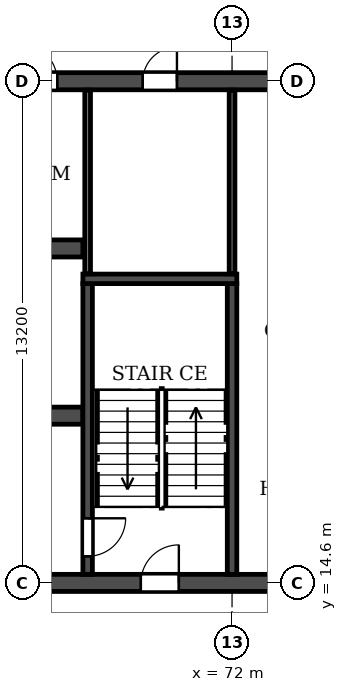
"""IFC4 building model, lengths in metres.
Left out: names, types, materials, properties, quantities, classifications, styles, units other than length and angle.
Written with IfcOpenShell. Run it as: python <this file> out.ifc"""

import sys

from ifc_helpers import new_model, si_unit, direction, frame, frame_2d, origin, place, context, subcontext, project, spatial, rectangle, extrude, element, fill, save


model = new_model("IFC4")
c1 = context("Model", 3, precision=1e-05, world=origin(), true_north=direction((0.0, 1.0)))
c2 = subcontext(c1, "Body", "Model", "MODEL_VIEW")
j1 = project(units=[si_unit("LENGTHUNIT", "METRE"), si_unit("PLANEANGLEUNIT", "RADIAN")], contexts=[c1])
p1 = place(None, origin())
s1 = spatial("IfcSite", under=j1, at=p1, CompositionType="ELEMENT")
p2 = place(p1, origin())
s2 = spatial("IfcBuilding", under=s1, at=p2, CompositionType="ELEMENT")
p3 = place(p2, frame((0.0, 0.0, 122.4)))
s3 = spatial("IfcBuildingStorey", under=s2, at=p3, CompositionType="ELEMENT", Elevation=122.4)
p4 = place(p3, frame((12.2, 14.6, 0.0), z_axis=(0.0, 0.0, 1.0), x_axis=(1.0, 0.0, 0.0)))
e1 = element("IfcWall", 1, at=p4, inside=s3, PredefinedType="SOLIDWALL", context=c2, shape_type="SweptSolid", body=[
    extrude(rectangle(XDim=77.6, YDim=0.45, at=frame_2d((38.8, 0.0))), origin(), (0.0, 0.0, 1.0), 3.07),
])
p5 = place(p4, frame((0.8, 0.0, 0.0)))
e2 = element("IfcOpeningElement", 2, at=p5, cuts=e1, PredefinedType="OPENING", context=c2, shape_type="SweptSolid", body=[
    extrude(rectangle(XDim=1.0, YDim=2.1, at=frame_2d((0.5, 1.05))), frame((0.0, 0.235, 0.0), z_axis=(0.0, -1.0, 0.0), x_axis=(1.0, 0.0, 0.0)), (0.0, 0.0, 1.0), 0.47),
])
p6 = place(p4, frame((3.8, 0.0, 0.0)))
e3 = element("IfcOpeningElement", 3, at=p6, cuts=e1, PredefinedType="OPENING", context=c2, shape_type="SweptSolid", body=[
    extrude(rectangle(XDim=1.0, YDim=2.1, at=frame_2d((0.5, 1.05))), frame((0.0, 0.235, 0.0), z_axis=(0.0, -1.0, 0.0), x_axis=(1.0, 0.0, 0.0)), (0.0, 0.0, 1.0), 0.47),
])
p7 = place(p4, frame((6.7, 0.0, 0.0)))
e4 = element("IfcOpeningElement", 4, at=p7, cuts=e1, PredefinedType="OPENING", context=c2, shape_type="SweptSolid", body=[
    extrude(rectangle(XDim=1.0, YDim=2.1, at=frame_2d((0.5, 1.05))), frame((0.0, 0.235, 0.0), z_axis=(0.0, -1.0, 0.0), x_axis=(1.0, 0.0, 0.0)), (0.0, 0.0, 1.0), 0.47),
])
p8 = place(p4, frame((14.6, 0.0, 0.0)))
e5 = element("IfcOpeningElement", 5, at=p8, cuts=e1, PredefinedType="OPENING", context=c2, shape_type="SweptSolid", body=[
    extrude(rectangle(XDim=1.0, YDim=2.1, at=frame_2d((0.5, 1.05))), frame((0.0, 0.235, 0.0), z_axis=(0.0, -1.0, 0.0), x_axis=(1.0, 0.0, 0.0)), (0.0, 0.0, 1.0), 0.47),
])
p9 = place(p4, frame((19.2, 0.0, 0.0)))
e6 = element("IfcOpeningElement", 6, at=p9, cuts=e1, PredefinedType="OPENING", context=c2, shape_type="SweptSolid", body=[
    extrude(rectangle(XDim=1.0, YDim=2.1, at=frame_2d((0.5, 1.05))), frame((0.0, 0.235, 0.0), z_axis=(0.0, -1.0, 0.0), x_axis=(1.0, 0.0, 0.0)), (0.0, 0.0, 1.0), 0.47),
])
p10 = place(p4, frame((30.5, 0.0, 0.0)))
e7 = element("IfcOpeningElement", 7, at=p10, cuts=e1, PredefinedType="OPENING", context=c2, shape_type="SweptSolid", body=[
    extrude(rectangle(XDim=1.0, YDim=2.1, at=frame_2d((0.5, 1.05))), frame((0.0, 0.235, 0.0), z_axis=(0.0, -1.0, 0.0), x_axis=(1.0, 0.0, 0.0)), (0.0, 0.0, 1.0), 0.47),
])
p11 = place(p4, frame((34.4, 0.0, 0.0)))
e8 = element("IfcOpeningElement", 8, at=p11, cuts=e1, PredefinedType="OPENING", context=c2, shape_type="SweptSolid", body=[
    extrude(rectangle(XDim=1.0, YDim=2.1, at=frame_2d((0.5, 1.05))), frame((0.0, 0.235, 0.0), z_axis=(0.0, -1.0, 0.0), x_axis=(1.0, 0.0, 0.0)), (0.0, 0.0, 1.0), 0.47),
])
p12 = place(p4, frame((38.3, 0.0, 0.0)))
e9 = element("IfcOpeningElement", 9, at=p12, cuts=e1, PredefinedType="OPENING", context=c2, shape_type="SweptSolid", body=[
    extrude(rectangle(XDim=1.0, YDim=2.1, at=frame_2d((0.5, 1.05))), frame((0.0, 0.235, 0.0), z_axis=(0.0, -1.0, 0.0), x_axis=(1.0, 0.0, 0.0)), (0.0, 0.0, 1.0), 0.47),
])
p13 = place(p4, frame((40.9, 0.0, 0.0)))
e10 = element("IfcOpeningElement", 10, at=p13, cuts=e1, PredefinedType="OPENING", context=c2, shape_type="SweptSolid", body=[
    extrude(rectangle(XDim=1.0, YDim=2.1, at=frame_2d((0.5, 1.05))), frame((0.0, 0.235, 0.0), z_axis=(0.0, -1.0, 0.0), x_axis=(1.0, 0.0, 0.0)), (0.0, 0.0, 1.0), 0.47),
])
p14 = place(p4, frame((44.8, 0.0, 0.0)))
e11 = element("IfcOpeningElement", 11, at=p14, cuts=e1, PredefinedType="OPENING", context=c2, shape_type="SweptSolid", body=[
    extrude(rectangle(XDim=1.0, YDim=2.1, at=frame_2d((0.5, 1.05))), frame((0.0, 0.235, 0.0), z_axis=(0.0, -1.0, 0.0), x_axis=(1.0, 0.0, 0.0)), (0.0, 0.0, 1.0), 0.47),
])
p15 = place(p4, frame((57.4, 0.0, 0.0)))
e12 = element("IfcOpeningElement", 12, at=p15, cuts=e1, PredefinedType="OPENING", context=c2, shape_type="SweptSolid", body=[
    extrude(rectangle(XDim=1.0, YDim=2.1, at=frame_2d((0.5, 1.05))), frame((0.0, 0.235, 0.0), z_axis=(0.0, -1.0, 0.0), x_axis=(1.0, 0.0, 0.0)), (0.0, 0.0, 1.0), 0.47),
])
p16 = place(p4, frame((62.0, 0.0, 0.0)))
e13 = element("IfcOpeningElement", 13, at=p16, cuts=e1, PredefinedType="OPENING", context=c2, shape_type="SweptSolid", body=[
    extrude(rectangle(XDim=1.0, YDim=2.1, at=frame_2d((0.5, 1.05))), frame((0.0, 0.235, 0.0), z_axis=(0.0, -1.0, 0.0), x_axis=(1.0, 0.0, 0.0)), (0.0, 0.0, 1.0), 0.47),
])
p17 = place(p4, frame((69.9, 0.0, 0.0)))
e14 = element("IfcOpeningElement", 14, at=p17, cuts=e1, PredefinedType="OPENING", context=c2, shape_type="SweptSolid", body=[
    extrude(rectangle(XDim=1.0, YDim=2.1, at=frame_2d((0.5, 1.05))), frame((0.0, 0.235, 0.0), z_axis=(0.0, -1.0, 0.0), x_axis=(1.0, 0.0, 0.0)), (0.0, 0.0, 1.0), 0.47),
])
p18 = place(p4, frame((72.8, 0.0, 0.0)))
e15 = element("IfcOpeningElement", 15, at=p18, cuts=e1, PredefinedType="OPENING", context=c2, shape_type="SweptSolid", body=[
    extrude(rectangle(XDim=1.0, YDim=2.1, at=frame_2d((0.5, 1.05))), frame((0.0, 0.235, 0.0), z_axis=(0.0, -1.0, 0.0), x_axis=(1.0, 0.0, 0.0)), (0.0, 0.0, 1.0), 0.47),
])
p19 = place(p4, frame((75.8, 0.0, 0.0)))
e16 = element("IfcOpeningElement", 16, at=p19, cuts=e1, PredefinedType="OPENING", context=c2, shape_type="SweptSolid", body=[
    extrude(rectangle(XDim=1.0, YDim=2.1, at=frame_2d((0.5, 1.05))), frame((0.0, 0.235, 0.0), z_axis=(0.0, -1.0, 0.0), x_axis=(1.0, 0.0, 0.0)), (0.0, 0.0, 1.0), 0.47),
])
p20 = place(p3, frame((12.2, 27.8, 0.0), z_axis=(0.0, 0.0, 1.0), x_axis=(1.0, 0.0, 0.0)))
e17 = element("IfcWall", 17, at=p20, inside=s3, PredefinedType="SOLIDWALL", context=c2, shape_type="SweptSolid", body=[
    extrude(rectangle(XDim=77.6, YDim=0.45, at=frame_2d((38.8, 0.0))), origin(), (0.0, 0.0, 1.0), 3.07),
])
p21 = place(p20, frame((0.8, 0.0, 0.0)))
e18 = element("IfcOpeningElement", 18, at=p21, cuts=e17, PredefinedType="OPENING", context=c2, shape_type="SweptSolid", body=[
    extrude(rectangle(XDim=1.0, YDim=2.1, at=frame_2d((0.5, 1.05))), frame((0.0, 0.235, 0.0), z_axis=(0.0, -1.0, 0.0), x_axis=(1.0, 0.0, 0.0)), (0.0, 0.0, 1.0), 0.47),
])
p22 = place(p20, frame((3.8, 0.0, 0.0)))
e19 = element("IfcOpeningElement", 19, at=p22, cuts=e17, PredefinedType="OPENING", context=c2, shape_type="SweptSolid", body=[
    extrude(rectangle(XDim=1.0, YDim=2.1, at=frame_2d((0.5, 1.05))), frame((0.0, 0.235, 0.0), z_axis=(0.0, -1.0, 0.0), x_axis=(1.0, 0.0, 0.0)), (0.0, 0.0, 1.0), 0.47),
])
p23 = place(p20, frame((6.7, 0.0, 0.0)))
e20 = element("IfcOpeningElement", 20, at=p23, cuts=e17, PredefinedType="OPENING", context=c2, shape_type="SweptSolid", body=[
    extrude(rectangle(XDim=1.0, YDim=2.1, at=frame_2d((0.5, 1.05))), frame((0.0, 0.235, 0.0), z_axis=(0.0, -1.0, 0.0), x_axis=(1.0, 0.0, 0.0)), (0.0, 0.0, 1.0), 0.47),
])
p24 = place(p20, frame((10.05, 0.0, 0.0)))
e21 = element("IfcOpeningElement", 21, at=p24, cuts=e17, PredefinedType="OPENING", context=c2, shape_type="SweptSolid", body=[
    extrude(rectangle(XDim=0.9, YDim=2.1, at=frame_2d((0.45, 1.05))), frame((0.0, 0.235, 0.0), z_axis=(0.0, -1.0, 0.0), x_axis=(1.0, 0.0, 0.0)), (0.0, 0.0, 1.0), 0.47),
])
p25 = place(p20, frame((19.25, 0.0, 0.0)))
e22 = element("IfcOpeningElement", 22, at=p25, cuts=e17, PredefinedType="OPENING", context=c2, shape_type="SweptSolid", body=[
    extrude(rectangle(XDim=0.9, YDim=2.1, at=frame_2d((0.45, 1.05))), frame((0.0, 0.235, 0.0), z_axis=(0.0, -1.0, 0.0), x_axis=(1.0, 0.0, 0.0)), (0.0, 0.0, 1.0), 0.47),
])
p26 = place(p20, frame((25.0, 0.0, 0.0)))
e23 = element("IfcOpeningElement", 23, at=p26, cuts=e17, PredefinedType="OPENING", context=c2, shape_type="SweptSolid", body=[
    extrude(rectangle(XDim=1.0, YDim=2.1, at=frame_2d((0.5, 1.05))), frame((0.0, 0.235, 0.0), z_axis=(0.0, -1.0, 0.0), x_axis=(1.0, 0.0, 0.0)), (0.0, 0.0, 1.0), 0.47),
])
p27 = place(p20, frame((30.2, 0.0, 0.0)))
e24 = element("IfcOpeningElement", 24, at=p27, cuts=e17, PredefinedType="OPENING", context=c2, shape_type="SweptSolid", body=[
    extrude(rectangle(XDim=1.0, YDim=2.1, at=frame_2d((0.5, 1.05))), frame((0.0, 0.235, 0.0), z_axis=(0.0, -1.0, 0.0), x_axis=(1.0, 0.0, 0.0)), (0.0, 0.0, 1.0), 0.47),
])
p28 = place(p20, frame((35.4, 0.0, 0.0)))
e25 = element("IfcOpeningElement", 25, at=p28, cuts=e17, PredefinedType="OPENING", context=c2, shape_type="SweptSolid", body=[
    extrude(rectangle(XDim=1.0, YDim=2.1, at=frame_2d((0.5, 1.05))), frame((0.0, 0.235, 0.0), z_axis=(0.0, -1.0, 0.0), x_axis=(1.0, 0.0, 0.0)), (0.0, 0.0, 1.0), 0.47),
])
p29 = place(p20, frame((38.3, 0.0, 0.0)))
e26 = element("IfcOpeningElement", 26, at=p29, cuts=e17, PredefinedType="OPENING", context=c2, shape_type="SweptSolid", body=[
    extrude(rectangle(XDim=1.0, YDim=2.1, at=frame_2d((0.5, 1.05))), frame((0.0, 0.235, 0.0), z_axis=(0.0, -1.0, 0.0), x_axis=(1.0, 0.0, 0.0)), (0.0, 0.0, 1.0), 0.47),
])
p30 = place(p20, frame((41.2, 0.0, 0.0)))
e27 = element("IfcOpeningElement", 27, at=p30, cuts=e17, PredefinedType="OPENING", context=c2, shape_type="SweptSolid", body=[
    extrude(rectangle(XDim=1.0, YDim=2.1, at=frame_2d((0.5, 1.05))), frame((0.0, 0.235, 0.0), z_axis=(0.0, -1.0, 0.0), x_axis=(1.0, 0.0, 0.0)), (0.0, 0.0, 1.0), 0.47),
])
p31 = place(p20, frame((46.4, 0.0, 0.0)))
e28 = element("IfcOpeningElement", 28, at=p31, cuts=e17, PredefinedType="OPENING", context=c2, shape_type="SweptSolid", body=[
    extrude(rectangle(XDim=1.0, YDim=2.1, at=frame_2d((0.5, 1.05))), frame((0.0, 0.235, 0.0), z_axis=(0.0, -1.0, 0.0), x_axis=(1.0, 0.0, 0.0)), (0.0, 0.0, 1.0), 0.47),
])
p32 = place(p20, frame((51.6, 0.0, 0.0)))
e29 = element("IfcOpeningElement", 29, at=p32, cuts=e17, PredefinedType="OPENING", context=c2, shape_type="SweptSolid", body=[
    extrude(rectangle(XDim=1.0, YDim=2.1, at=frame_2d((0.5, 1.05))), frame((0.0, 0.235, 0.0), z_axis=(0.0, -1.0, 0.0), x_axis=(1.0, 0.0, 0.0)), (0.0, 0.0, 1.0), 0.47),
])
p33 = place(p20, frame((54.2, 0.0, 0.0)))
e30 = element("IfcOpeningElement", 30, at=p33, cuts=e17, PredefinedType="OPENING", context=c2, shape_type="SweptSolid", body=[
    extrude(rectangle(XDim=1.0, YDim=2.1, at=frame_2d((0.5, 1.05))), frame((0.0, 0.235, 0.0), z_axis=(0.0, -1.0, 0.0), x_axis=(1.0, 0.0, 0.0)), (0.0, 0.0, 1.0), 0.47),
])
p34 = place(p20, frame((57.45, 0.0, 0.0)))
e31 = element("IfcOpeningElement", 31, at=p34, cuts=e17, PredefinedType="OPENING", context=c2, shape_type="SweptSolid", body=[
    extrude(rectangle(XDim=0.9, YDim=2.1, at=frame_2d((0.45, 1.05))), frame((0.0, 0.235, 0.0), z_axis=(0.0, -1.0, 0.0), x_axis=(1.0, 0.0, 0.0)), (0.0, 0.0, 1.0), 0.47),
])
p35 = place(p20, frame((66.65, 0.0, 0.0)))
e32 = element("IfcOpeningElement", 32, at=p35, cuts=e17, PredefinedType="OPENING", context=c2, shape_type="SweptSolid", body=[
    extrude(rectangle(XDim=0.9, YDim=2.1, at=frame_2d((0.45, 1.05))), frame((0.0, 0.235, 0.0), z_axis=(0.0, -1.0, 0.0), x_axis=(1.0, 0.0, 0.0)), (0.0, 0.0, 1.0), 0.47),
])
p36 = place(p20, frame((69.9, 0.0, 0.0)))
e33 = element("IfcOpeningElement", 33, at=p36, cuts=e17, PredefinedType="OPENING", context=c2, shape_type="SweptSolid", body=[
    extrude(rectangle(XDim=1.0, YDim=2.1, at=frame_2d((0.5, 1.05))), frame((0.0, 0.235, 0.0), z_axis=(0.0, -1.0, 0.0), x_axis=(1.0, 0.0, 0.0)), (0.0, 0.0, 1.0), 0.47),
])
p37 = place(p20, frame((72.8, 0.0, 0.0)))
e34 = element("IfcOpeningElement", 34, at=p37, cuts=e17, PredefinedType="OPENING", context=c2, shape_type="SweptSolid", body=[
    extrude(rectangle(XDim=1.0, YDim=2.1, at=frame_2d((0.5, 1.05))), frame((0.0, 0.235, 0.0), z_axis=(0.0, -1.0, 0.0), x_axis=(1.0, 0.0, 0.0)), (0.0, 0.0, 1.0), 0.47),
])
p38 = place(p20, frame((75.8, 0.0, 0.0)))
e35 = element("IfcOpeningElement", 35, at=p38, cuts=e17, PredefinedType="OPENING", context=c2, shape_type="SweptSolid", body=[
    extrude(rectangle(XDim=1.0, YDim=2.1, at=frame_2d((0.5, 1.05))), frame((0.0, 0.235, 0.0), z_axis=(0.0, -1.0, 0.0), x_axis=(1.0, 0.0, 0.0)), (0.0, 0.0, 1.0), 0.47),
])
p39 = place(p3, frame((33.925, 19.0, 0.0), z_axis=(0.0, 0.0, 1.0), x_axis=(1.0, 0.0, 0.0)))
e36 = element("IfcWall", 36, at=p39, inside=s3, PredefinedType="SOLIDWALL", context=c2, shape_type="SweptSolid", body=[
    extrude(rectangle(XDim=34.15, YDim=0.45, at=frame_2d((17.075, 0.0))), origin(), (0.0, 0.0, 1.0), 3.07),
])
p40 = place(p39, frame((16.175, 0.0, 0.0)))
e37 = element("IfcOpeningElement", 37, at=p40, cuts=e36, PredefinedType="OPENING", context=c2, shape_type="SweptSolid", body=[
    extrude(rectangle(XDim=1.8, YDim=2.1, at=frame_2d((0.9, 1.05))), frame((0.0, 0.235, 0.0), z_axis=(0.0, -1.0, 0.0), x_axis=(1.0, 0.0, 0.0)), (0.0, 0.0, 1.0), 0.47),
])
p41 = place(p39, frame((1.525, 0.0, 0.0)))
e38 = element("IfcOpeningElement", 38, at=p41, cuts=e36, PredefinedType="OPENING", context=c2, shape_type="SweptSolid", body=[
    extrude(rectangle(XDim=1.8, YDim=2.1, at=frame_2d((0.9, 1.05))), frame((0.0, 0.235, 0.0), z_axis=(0.0, -1.0, 0.0), x_axis=(1.0, 0.0, 0.0)), (0.0, 0.0, 1.0), 0.47),
])
p42 = place(p39, frame((30.825, 0.0, 0.0)))
e39 = element("IfcOpeningElement", 39, at=p42, cuts=e36, PredefinedType="OPENING", context=c2, shape_type="SweptSolid", body=[
    extrude(rectangle(XDim=1.8, YDim=2.1, at=frame_2d((0.9, 1.05))), frame((0.0, 0.235, 0.0), z_axis=(0.0, -1.0, 0.0), x_axis=(1.0, 0.0, 0.0)), (0.0, 0.0, 1.0), 0.47),
])
p43 = place(p3, frame((33.925, 23.4, 0.0), z_axis=(0.0, 0.0, 1.0), x_axis=(1.0, 0.0, 0.0)))
e40 = element("IfcWall", 40, at=p43, inside=s3, PredefinedType="SOLIDWALL", context=c2, shape_type="SweptSolid", body=[
    extrude(rectangle(XDim=34.15, YDim=0.45, at=frame_2d((17.075, 0.0))), origin(), (0.0, 0.0, 1.0), 3.07),
])
p44 = place(p43, frame((16.175, 0.0, 0.0)))
e41 = element("IfcOpeningElement", 41, at=p44, cuts=e40, PredefinedType="OPENING", context=c2, shape_type="SweptSolid", body=[
    extrude(rectangle(XDim=1.8, YDim=2.1, at=frame_2d((0.9, 1.05))), frame((0.0, 0.235, 0.0), z_axis=(0.0, -1.0, 0.0), x_axis=(1.0, 0.0, 0.0)), (0.0, 0.0, 1.0), 0.47),
])
p45 = place(p43, frame((0.625, 0.0, 0.0)))
e42 = element("IfcOpeningElement", 42, at=p45, cuts=e40, PredefinedType="OPENING", context=c2, shape_type="SweptSolid", body=[
    extrude(rectangle(XDim=1.1, YDim=2.1, at=frame_2d((0.55, 1.05))), frame((0.0, 0.235, 0.0), z_axis=(0.0, -1.0, 0.0), x_axis=(1.0, 0.0, 0.0)), (0.0, 0.0, 1.0), 0.47),
])
p46 = place(p43, frame((3.225, 0.0, 0.0)))
e43 = element("IfcOpeningElement", 43, at=p46, cuts=e40, PredefinedType="OPENING", context=c2, shape_type="SweptSolid", body=[
    extrude(rectangle(XDim=1.1, YDim=2.1, at=frame_2d((0.55, 1.05))), frame((0.0, 0.235, 0.0), z_axis=(0.0, -1.0, 0.0), x_axis=(1.0, 0.0, 0.0)), (0.0, 0.0, 1.0), 0.47),
])
p47 = place(p43, frame((5.825, 0.0, 0.0)))
e44 = element("IfcOpeningElement", 44, at=p47, cuts=e40, PredefinedType="OPENING", context=c2, shape_type="SweptSolid", body=[
    extrude(rectangle(XDim=1.1, YDim=2.1, at=frame_2d((0.55, 1.05))), frame((0.0, 0.235, 0.0), z_axis=(0.0, -1.0, 0.0), x_axis=(1.0, 0.0, 0.0)), (0.0, 0.0, 1.0), 0.47),
])
p48 = place(p43, frame((8.425, 0.0, 0.0)))
e45 = element("IfcOpeningElement", 45, at=p48, cuts=e40, PredefinedType="OPENING", context=c2, shape_type="SweptSolid", body=[
    extrude(rectangle(XDim=1.1, YDim=2.1, at=frame_2d((0.55, 1.05))), frame((0.0, 0.235, 0.0), z_axis=(0.0, -1.0, 0.0), x_axis=(1.0, 0.0, 0.0)), (0.0, 0.0, 1.0), 0.47),
])
p49 = place(p43, frame((11.025, 0.0, 0.0)))
e46 = element("IfcOpeningElement", 46, at=p49, cuts=e40, PredefinedType="OPENING", context=c2, shape_type="SweptSolid", body=[
    extrude(rectangle(XDim=1.1, YDim=2.1, at=frame_2d((0.55, 1.05))), frame((0.0, 0.235, 0.0), z_axis=(0.0, -1.0, 0.0), x_axis=(1.0, 0.0, 0.0)), (0.0, 0.0, 1.0), 0.47),
])
p50 = place(p43, frame((13.625, 0.0, 0.0)))
e47 = element("IfcOpeningElement", 47, at=p50, cuts=e40, PredefinedType="OPENING", context=c2, shape_type="SweptSolid", body=[
    extrude(rectangle(XDim=1.1, YDim=2.1, at=frame_2d((0.55, 1.05))), frame((0.0, 0.235, 0.0), z_axis=(0.0, -1.0, 0.0), x_axis=(1.0, 0.0, 0.0)), (0.0, 0.0, 1.0), 0.47),
])
p51 = place(p43, frame((27.225, 0.0, 0.0)))
e48 = element("IfcOpeningElement", 48, at=p51, cuts=e40, PredefinedType="OPENING", context=c2, shape_type="SweptSolid", body=[
    extrude(rectangle(XDim=1.1, YDim=2.1, at=frame_2d((0.55, 1.05))), frame((0.0, 0.235, 0.0), z_axis=(0.0, -1.0, 0.0), x_axis=(1.0, 0.0, 0.0)), (0.0, 0.0, 1.0), 0.47),
])
p52 = place(p3, frame((68.2, 14.825, 0.0), z_axis=(0.0, 0.0, 1.0), x_axis=(0.0, 1.0, 0.0)))
e49 = element("IfcWall", 49, at=p52, inside=s3, PredefinedType="SOLIDWALL", context=c2, shape_type="SweptSolid", body=[
    extrude(rectangle(XDim=7.65, YDim=0.25, at=frame_2d((3.825, 0.0))), origin(), (0.0, 0.0, 1.0), 3.07),
])
p53 = place(p52, frame((0.475, 0.0, 0.0)))
e50 = element("IfcOpeningElement", 50, at=p53, cuts=e49, PredefinedType="OPENING", context=c2, shape_type="SweptSolid", body=[
    extrude(rectangle(XDim=1.0, YDim=2.1, at=frame_2d((0.5, 1.05))), frame((0.0, 0.135, 0.0), z_axis=(0.0, -1.0, 0.0), x_axis=(1.0, 0.0, 0.0)), (0.0, 0.0, 1.0), 0.27),
])
p54 = place(p3, frame((72.0, 14.825, 0.0), z_axis=(0.0, 0.0, 1.0), x_axis=(0.0, 1.0, 0.0)))
e51 = element("IfcWall", 51, at=p54, inside=s3, PredefinedType="SOLIDWALL", context=c2, shape_type="SweptSolid", body=[
    extrude(rectangle(XDim=7.65, YDim=0.25, at=frame_2d((3.825, 0.0))), origin(), (0.0, 0.0, 1.0), 3.07),
])
p55 = place(p3, frame((68.075, 22.6, 0.0), z_axis=(0.0, 0.0, 1.0), x_axis=(1.0, 0.0, 0.0)))
e52 = element("IfcWall", 52, at=p55, inside=s3, PredefinedType="SOLIDWALL", context=c2, shape_type="SweptSolid", body=[
    extrude(rectangle(XDim=4.05, YDim=0.25, at=frame_2d((2.025, 0.0))), origin(), (0.0, 0.0, 1.0), 3.07),
])
for number, where, z_axis, x_axis in (
    (53, (68.2, 22.735, 0.0), (0.0, 0.0, 1.0), (0.0, 1.0, 0.0)),
    (54, (72.0, 22.735, 0.0), (0.0, 0.0, 1.0), (0.0, 1.0, 0.0)),
):
    element("IfcWall", number, at=place(p3, frame(where, z_axis=z_axis, x_axis=x_axis)), inside=s3, PredefinedType="PARTITIONING", context=c2, shape_type="SweptSolid", body=[
        extrude(rectangle(XDim=4.83, YDim=0.15, at=frame_2d((2.415, 0.0))), origin(), (0.0, 0.0, 1.0), 3.07),
    ])
p56 = place(p33, origin())
e55 = element("IfcDoor", 55, at=p56, inside=s3, OperationType="SINGLE_SWING_LEFT", PredefinedType="DOOR", context=c2, shape_type="SweptSolid", body=[
    extrude(rectangle(XDim=1.0, YDim=2.1, at=frame_2d((0.5, 1.05))), frame((0.0, 0.025, 0.0), z_axis=(0.0, -1.0, 0.0), x_axis=(1.0, 0.0, 0.0)), (0.0, 0.0, 1.0), 0.05),
])
fill(e30, e55)
p57 = place(p34, origin())
e56 = element("IfcDoor", 56, at=p57, inside=s3, OperationType="SINGLE_SWING_RIGHT", PredefinedType="DOOR", context=c2, shape_type="SweptSolid", body=[
    extrude(rectangle(XDim=0.9, YDim=2.1, at=frame_2d((0.45, 1.05))), frame((0.0, 0.025, 0.0), z_axis=(0.0, -1.0, 0.0), x_axis=(1.0, 0.0, 0.0)), (0.0, 0.0, 1.0), 0.05),
])
fill(e31, e56)
p58 = place(p15, origin())
e57 = element("IfcDoor", 57, at=p58, inside=s3, OperationType="SINGLE_SWING_RIGHT", PredefinedType="DOOR", context=c2, shape_type="SweptSolid", body=[
    extrude(rectangle(XDim=1.0, YDim=2.1, at=frame_2d((0.5, 1.05))), frame((0.0, 0.025, 0.0), z_axis=(0.0, -1.0, 0.0), x_axis=(1.0, 0.0, 0.0)), (0.0, 0.0, 1.0), 0.05),
])
fill(e12, e57)
p59 = place(p53, frame((1.0, 0.0, 0.0), z_axis=(0.0, 0.0, 1.0), x_axis=(-1.0, 0.0, 0.0)))
e58 = element("IfcDoor", 58, at=p59, inside=s3, OperationType="SINGLE_SWING_LEFT", PredefinedType="DOOR", context=c2, shape_type="SweptSolid", body=[
    extrude(rectangle(XDim=1.0, YDim=2.1, at=frame_2d((0.5, 1.05))), frame((0.0, 0.025, 0.0), z_axis=(0.0, -1.0, 0.0), x_axis=(1.0, 0.0, 0.0)), (0.0, 0.0, 1.0), 0.05),
])
fill(e50, e58)
save(model, sys.argv[1])
